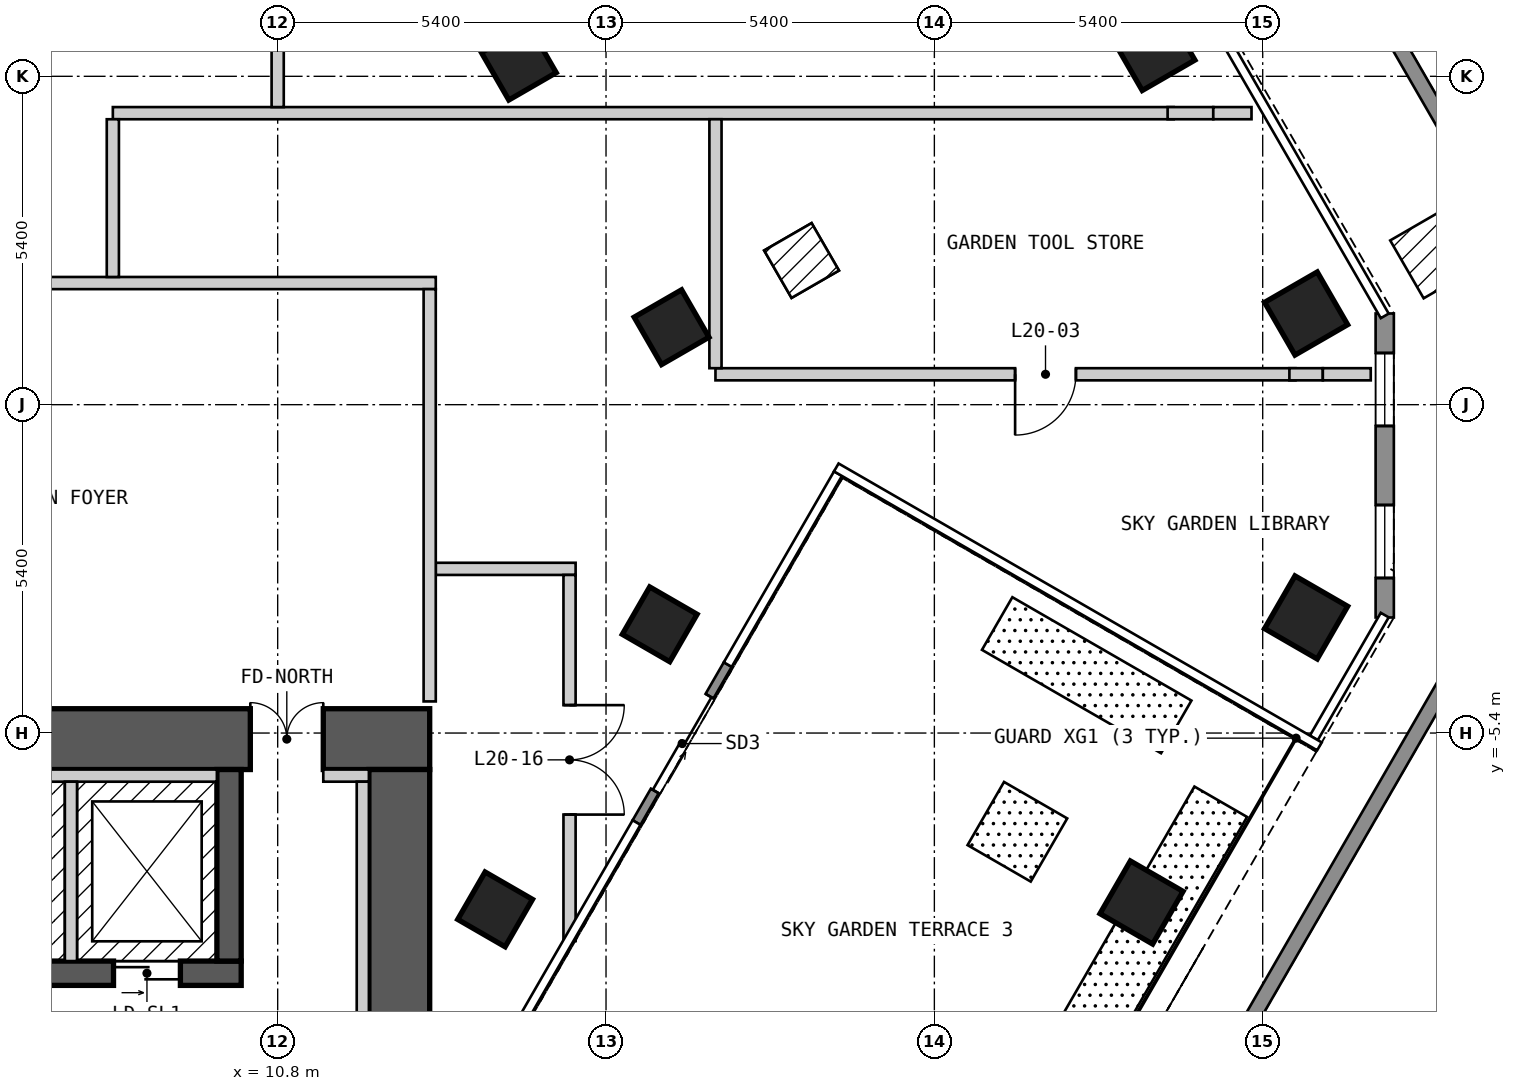
"""IFC4 building model, lengths in metres.
Left out: names, types, materials, properties, quantities, classifications, styles, units other than length and angle.
Written with IfcOpenShell. Run it as: python <this file> out.ifc"""

import sys

from ifc_helpers import new_model, si_unit, direction, frame, frame_2d, origin, origin_2d, place, context, subcontext, project, spatial, polyline, rectangle, outline, extrude, element, fill, save


model = new_model("IFC4")
c1 = context("Model", 3, precision=1e-05, world=origin(), true_north=direction((0.0, 1.0)))
c2 = subcontext(c1, "Body", "Model", "MODEL_VIEW")
j1 = project(units=[si_unit("LENGTHUNIT", "METRE"), si_unit("PLANEANGLEUNIT", "RADIAN")], contexts=[c1])
p1 = place(None, origin())
s1 = spatial("IfcSite", under=j1, at=p1, CompositionType="ELEMENT")
p2 = place(p1, origin())
s2 = spatial("IfcBuilding", under=s1, at=p2, CompositionType="ELEMENT")
p3 = place(p2, frame((0.0, 0.0, 66.0)))
s3 = spatial("IfcBuildingStorey", under=s2, at=p3, CompositionType="ELEMENT", Elevation=66.0)
for number, where, z_axis, x_axis in (
    (1, (25.007, -8.187, 0.0), (0.0, 0.0, 1.0), (0.5, 0.866, 0.0)),
    (2, (27.714, -3.499, 0.0), (0.0, 0.0, 1.0), (0.5, 0.866, 0.0)),
    (3, (27.714, 1.499, 0.0), (0.0, 0.0, 1.0), (-0.5, 0.866, 0.0)),
    (4, (25.202, 5.85, 0.0), (0.0, 0.0, 1.0), (-0.5, 0.866, 0.0)),
):
    element("IfcColumn", number, at=place(p3, frame(where, z_axis=z_axis, x_axis=x_axis)), inside=s3, PredefinedType="COLUMN", context=c2, shape_type="SweptSolid", body=[
        extrude(rectangle(XDim=1.0, YDim=1.0, at=origin_2d()), origin(), (0.0, 0.0, 1.0), 6.0),
    ])
for number, where, z_axis, x_axis in (
    (5, (14.376, -8.3, 0.0), (0.0, 0.0, 1.0), (0.5, 0.866, 0.0)),
    (6, (17.083, -3.612, 0.0), (0.0, 0.0, 1.0), (0.5, 0.866, 0.0)),
    (7, (17.278, 1.274, 0.0), (0.0, 0.0, 1.0), (-0.5, 0.866, 0.0)),
    (8, (14.766, 5.625, 0.0), (0.0, 0.0, 1.0), (-0.5, 0.866, 0.0)),
):
    element("IfcColumn", number, at=place(p3, frame(where, z_axis=z_axis, x_axis=x_axis)), inside=s3, PredefinedType="COLUMN", context=c2, shape_type="SweptSolid", body=[
        extrude(rectangle(XDim=0.9, YDim=0.9, at=origin_2d()), origin(), (0.0, 0.0, 1.0), 6.0),
    ])
p4 = place(p3, frame((-13.3, -5.5, 0.0), z_axis=(0.0, 0.0, 1.0), x_axis=(1.0, 0.0, 0.0)))
e9 = element("IfcWall", 9, at=p4, inside=s3, PredefinedType="SHEAR", context=c2, shape_type="SweptSolid", body=[
    extrude(rectangle(XDim=26.6, YDim=1.0, at=frame_2d((13.3, 0.0))), origin(), (0.0, 0.0, 1.0), 5.7),
])
p5 = place(p4, frame((23.65, 0.0, 0.0)))
e10 = element("IfcOpeningElement", 10, at=p5, cuts=e9, PredefinedType="OPENING", context=c2, shape_type="SweptSolid", body=[
    extrude(rectangle(XDim=1.2, YDim=2.1, at=frame_2d((0.6, 1.05))), frame((0.0, 0.51, 0.0), z_axis=(0.0, -1.0, 0.0), x_axis=(1.0, 0.0, 0.0)), (0.0, 0.0, 1.0), 1.02),
])
p6 = place(p3, frame((12.8, -18.0, 0.0), z_axis=(0.0, 0.0, 1.0), x_axis=(0.0, 1.0, 0.0)))
e11 = element("IfcWall", 11, at=p6, inside=s3, PredefinedType="SHEAR", context=c2, shape_type="SweptSolid", body=[
    extrude(rectangle(XDim=12.0, YDim=1.0, at=frame_2d((6.0, 0.0))), origin(), (0.0, 0.0, 1.0), 5.7),
])
p7 = place(p3, frame((-12.3, -9.35, 0.0), z_axis=(0.0, 0.0, 1.0), x_axis=(1.0, 0.0, 0.0)))
e12 = element("IfcWall", 12, at=p7, inside=s3, PredefinedType="SHEAR", context=c2, shape_type="SweptSolid", body=[
    extrude(rectangle(XDim=22.5, YDim=0.4, at=frame_2d((11.25, 0.0))), origin(), (0.0, 0.0, 1.0), 5.7),
])
p8 = place(p7, frame((0.9, 0.0, 0.0)))
e13 = element("IfcOpeningElement", 13, at=p8, cuts=e12, PredefinedType="OPENING", context=c2, shape_type="SweptSolid", body=[
    extrude(rectangle(XDim=1.1, YDim=2.1, at=frame_2d((0.55, 1.05))), frame((0.0, 0.21, 0.0), z_axis=(0.0, -1.0, 0.0), x_axis=(1.0, 0.0, 0.0)), (0.0, 0.0, 1.0), 0.42),
])
p9 = place(p7, frame((3.7, 0.0, 0.0)))
e14 = element("IfcOpeningElement", 14, at=p9, cuts=e12, PredefinedType="OPENING", context=c2, shape_type="SweptSolid", body=[
    extrude(rectangle(XDim=1.1, YDim=2.1, at=frame_2d((0.55, 1.05))), frame((0.0, 0.21, 0.0), z_axis=(0.0, -1.0, 0.0), x_axis=(1.0, 0.0, 0.0)), (0.0, 0.0, 1.0), 0.42),
])
p10 = place(p7, frame((6.5, 0.0, 0.0)))
e15 = element("IfcOpeningElement", 15, at=p10, cuts=e12, PredefinedType="OPENING", context=c2, shape_type="SweptSolid", body=[
    extrude(rectangle(XDim=1.1, YDim=2.1, at=frame_2d((0.55, 1.05))), frame((0.0, 0.21, 0.0), z_axis=(0.0, -1.0, 0.0), x_axis=(1.0, 0.0, 0.0)), (0.0, 0.0, 1.0), 0.42),
])
p11 = place(p7, frame((8.8, 0.0, 0.0)))
e16 = element("IfcOpeningElement", 16, at=p11, cuts=e12, PredefinedType="OPENING", context=c2, shape_type="SweptSolid", body=[
    extrude(rectangle(XDim=1.1, YDim=2.1, at=frame_2d((0.55, 1.05))), frame((0.0, 0.21, 0.0), z_axis=(0.0, -1.0, 0.0), x_axis=(1.0, 0.0, 0.0)), (0.0, 0.0, 1.0), 0.42),
])
p12 = place(p7, frame((11.1, 0.0, 0.0)))
e17 = element("IfcOpeningElement", 17, at=p12, cuts=e12, PredefinedType="OPENING", context=c2, shape_type="SweptSolid", body=[
    extrude(rectangle(XDim=1.1, YDim=2.1, at=frame_2d((0.55, 1.05))), frame((0.0, 0.21, 0.0), z_axis=(0.0, -1.0, 0.0), x_axis=(1.0, 0.0, 0.0)), (0.0, 0.0, 1.0), 0.42),
])
p13 = place(p7, frame((13.4, 0.0, 0.0)))
e18 = element("IfcOpeningElement", 18, at=p13, cuts=e12, PredefinedType="OPENING", context=c2, shape_type="SweptSolid", body=[
    extrude(rectangle(XDim=1.1, YDim=2.1, at=frame_2d((0.55, 1.05))), frame((0.0, 0.21, 0.0), z_axis=(0.0, -1.0, 0.0), x_axis=(1.0, 0.0, 0.0)), (0.0, 0.0, 1.0), 0.42),
])
p14 = place(p7, frame((15.7, 0.0, 0.0)))
e19 = element("IfcOpeningElement", 19, at=p14, cuts=e12, PredefinedType="OPENING", context=c2, shape_type="SweptSolid", body=[
    extrude(rectangle(XDim=1.1, YDim=2.1, at=frame_2d((0.55, 1.05))), frame((0.0, 0.21, 0.0), z_axis=(0.0, -1.0, 0.0), x_axis=(1.0, 0.0, 0.0)), (0.0, 0.0, 1.0), 0.42),
])
p15 = place(p7, frame((18.0, 0.0, 0.0)))
e20 = element("IfcOpeningElement", 20, at=p15, cuts=e12, PredefinedType="OPENING", context=c2, shape_type="SweptSolid", body=[
    extrude(rectangle(XDim=1.1, YDim=2.1, at=frame_2d((0.55, 1.05))), frame((0.0, 0.21, 0.0), z_axis=(0.0, -1.0, 0.0), x_axis=(1.0, 0.0, 0.0)), (0.0, 0.0, 1.0), 0.42),
])
p16 = place(p7, frame((20.4, 0.0, 0.0)))
e21 = element("IfcOpeningElement", 21, at=p16, cuts=e12, PredefinedType="OPENING", context=c2, shape_type="SweptSolid", body=[
    extrude(rectangle(XDim=1.1, YDim=2.1, at=frame_2d((0.55, 1.05))), frame((0.0, 0.21, 0.0), z_axis=(0.0, -1.0, 0.0), x_axis=(1.0, 0.0, 0.0)), (0.0, 0.0, 1.0), 0.42),
])
p17 = place(p3, frame((10.0, -9.15, 0.0), z_axis=(0.0, 0.0, 1.0), x_axis=(0.0, 1.0, 0.0)))
e22 = element("IfcWall", 22, at=p17, inside=s3, PredefinedType="SHEAR", context=c2, shape_type="SweptSolid", body=[
    extrude(rectangle(XDim=3.15, YDim=0.4, at=frame_2d((1.575, 0.0))), origin(), (0.0, 0.0, 1.0), 5.7),
])
p18 = place(p3, frame((29.007, -3.5, 0.0), z_axis=(0.0, 0.0, 1.0), x_axis=(0.0, 1.0, 0.0)))
e23 = element("IfcWall", 23, at=p18, inside=s3, PredefinedType="SOLIDWALL", context=c2, shape_type="SweptSolid", body=[
    extrude(outline(polyline([(0.0, -0.15), (5.0, -0.15), (4.92, 0.15), (0.08, 0.15), (0.0, -0.15)])), origin(), (0.0, 0.0, 1.0), 5.7),
])
p19 = place(p18, frame((0.65, 0.0, 0.15)))
e24 = element("IfcOpeningElement", 24, at=p19, cuts=e23, PredefinedType="OPENING", context=c2, shape_type="SweptSolid", body=[
    extrude(rectangle(XDim=1.2, YDim=2.1, at=frame_2d((0.6, 1.05))), frame((0.0, 0.16, 0.0), z_axis=(0.0, -1.0, 0.0), x_axis=(1.0, 0.0, 0.0)), (0.0, 0.0, 1.0), 0.32),
])
p20 = place(p18, frame((3.15, 0.0, 0.15)))
e25 = element("IfcOpeningElement", 25, at=p20, cuts=e23, PredefinedType="OPENING", context=c2, shape_type="SweptSolid", body=[
    extrude(rectangle(XDim=1.2, YDim=2.1, at=frame_2d((0.6, 1.05))), frame((0.0, 0.16, 0.0), z_axis=(0.0, -1.0, 0.0), x_axis=(1.0, 0.0, 0.0)), (0.0, 0.0, 1.0), 0.32),
])
p21 = place(p3, frame((16.702, -6.872, 0.0), z_axis=(0.0, 0.0, 1.0), x_axis=(0.499990139034, 0.866031096941, 0.0)))
e26 = element("IfcWall", 26, at=p21, inside=s3, PredefinedType="SOLIDWALL", context=c2, shape_type="SweptSolid", body=[
    extrude(rectangle(XDim=3.0, YDim=0.15, at=frame_2d((1.5, 0.0))), origin(), (0.0, 0.0, 1.0), 5.7),
])
p22 = place(p21, frame((0.6, 0.0, 0.0)))
e27 = element("IfcOpeningElement", 27, at=p22, cuts=e26, PredefinedType="OPENING", context=c2, shape_type="SweptSolid", body=[
    extrude(rectangle(XDim=1.8, YDim=2.4, at=frame_2d((0.9, 1.2))), frame((0.0, 0.085, 0.0), z_axis=(0.0, -1.0, 0.0), x_axis=(1.0, 0.0, 0.0)), (0.0, 0.0, 1.0), 0.17),
])
for number, where, z_axis, x_axis in (
    (28, (17.731, 25.837, 0.0), (0.0, 0.0, 1.0), (0.5, -0.866, 0.0)),
    (29, (31.242, -2.438, 0.0), (0.0, 0.0, 1.0), (-0.5, -0.866, 0.0)),
):
    element("IfcWall", number, at=place(p3, frame(where, z_axis=z_axis, x_axis=x_axis)), inside=s3, PredefinedType="PARAPET", context=c2, shape_type="SweptSolid", body=[
        extrude(outline(polyline([(0.067, -0.125), (26.953, -0.125), (27.02, 0.125), (0.0, 0.125), (0.067, -0.125)])), origin(), (0.0, 0.0, 1.0), 1.6),
    ])
p23 = place(p3, frame((13.4, -2.7, 0.0), z_axis=(0.0, 0.0, 1.0), x_axis=(1.0, 0.0, 0.0)))
e30 = element("IfcWall", 30, at=p23, inside=s3, PredefinedType="PARTITIONING", context=c2, shape_type="SweptSolid", body=[
    extrude(rectangle(XDim=2.3, YDim=0.2, at=frame_2d((1.15, 0.0))), origin(), (0.0, 0.0, 1.0), 5.7),
])
p24 = place(p3, frame((18.0, 0.5, 0.0), z_axis=(0.0, 0.0, 1.0), x_axis=(1.0, 0.0, 0.0)))
e31 = element("IfcWall", 31, at=p24, inside=s3, PredefinedType="PARTITIONING", context=c2, shape_type="SweptSolid", body=[
    extrude(rectangle(XDim=9.539, YDim=0.2, at=frame_2d((4.77, 0.0))), origin(), (0.0, 0.0, 1.0), 5.7),
])
p25 = place(p24, frame((5.928, 0.0, 0.0), z_axis=(0.0, 0.0, 1.0), x_axis=(-1.0, 0.0, 0.0)))
e32 = element("IfcOpeningElement", 32, at=p25, cuts=e31, PredefinedType="OPENING", context=c2, shape_type="SweptSolid", body=[
    extrude(rectangle(XDim=1.0, YDim=2.1, at=frame_2d((0.5, 1.05))), frame((0.0, 0.11, 0.0), z_axis=(0.0, -1.0, 0.0), x_axis=(1.0, 0.0, 0.0)), (0.0, 0.0, 1.0), 0.22),
])
p26 = place(p3, frame((27.439, 0.5, 0.0), z_axis=(0.0, 0.0, 1.0), x_axis=(1.0, 0.0, 0.0)))
e33 = element("IfcWall", 33, at=p26, inside=s3, PredefinedType="PARTITIONING", context=c2, shape_type="SweptSolid", body=[
    extrude(rectangle(XDim=0.55, YDim=0.2, at=frame_2d((0.275, 0.0))), origin(), (0.0, 0.0, 1.0), 5.02),
])
p27 = place(p3, frame((27.989, 0.5, 0.0), z_axis=(0.0, 0.0, 1.0), x_axis=(1.0, 0.0, 0.0)))
e34 = element("IfcWall", 34, at=p27, inside=s3, PredefinedType="PARTITIONING", context=c2, shape_type="SweptSolid", body=[
    extrude(rectangle(XDim=0.788, YDim=0.2, at=frame_2d((0.394, 0.0))), origin(), (0.0, 0.0, 1.0), 5.7),
])
p28 = place(p3, frame((-22.0, 2.0, 0.0), z_axis=(0.0, 0.0, 1.0), x_axis=(1.0, 0.0, 0.0)))
e35 = element("IfcWall", 35, at=p28, inside=s3, PredefinedType="PARTITIONING", context=c2, shape_type="SweptSolid", body=[
    extrude(rectangle(XDim=35.4, YDim=0.2, at=frame_2d((17.7, 0.0))), origin(), (0.0, 0.0, 1.0), 5.7),
])
p29 = place(p28, frame((3.89, 0.0, 0.0), z_axis=(0.0, 0.0, 1.0), x_axis=(-1.0, 0.0, 0.0)))
e36 = element("IfcOpeningElement", 36, at=p29, cuts=e35, PredefinedType="OPENING", context=c2, shape_type="SweptSolid", body=[
    extrude(rectangle(XDim=1.0, YDim=2.1, at=frame_2d((0.5, 1.05))), frame((0.0, 0.11, 0.0), z_axis=(0.0, -1.0, 0.0), x_axis=(1.0, 0.0, 0.0)), (0.0, 0.0, 1.0), 0.22),
])
p30 = place(p28, frame((21.1, 0.0, 0.0)))
e37 = element("IfcOpeningElement", 37, at=p30, cuts=e35, PredefinedType="OPENING", context=c2, shape_type="SweptSolid", body=[
    extrude(rectangle(XDim=1.8, YDim=2.1, at=frame_2d((0.9, 1.05))), frame((0.0, 0.11, 0.0), z_axis=(0.0, -1.0, 0.0), x_axis=(1.0, 0.0, 0.0)), (0.0, 0.0, 1.0), 0.22),
])
p31 = place(p28, frame((9.316, 0.0, 0.0)))
e38 = element("IfcOpeningElement", 38, at=p31, cuts=e35, PredefinedType="OPENING", context=c2, shape_type="SweptSolid", body=[
    extrude(rectangle(XDim=1.0, YDim=2.1, at=frame_2d((0.5, 1.05))), frame((0.0, 0.11, 0.0), z_axis=(0.0, -1.0, 0.0), x_axis=(1.0, 0.0, 0.0)), (0.0, 0.0, 1.0), 0.22),
])
p32 = place(p28, frame((13.102, 0.0, 0.0)))
e39 = element("IfcOpeningElement", 39, at=p32, cuts=e35, PredefinedType="OPENING", context=c2, shape_type="SweptSolid", body=[
    extrude(rectangle(XDim=1.8, YDim=2.1, at=frame_2d((0.9, 1.05))), frame((0.0, 0.11, 0.0), z_axis=(0.0, -1.0, 0.0), x_axis=(1.0, 0.0, 0.0)), (0.0, 0.0, 1.0), 0.22),
])
p33 = place(p3, frame((8.089, 4.794, 0.0), z_axis=(0.0, 0.0, 1.0), x_axis=(1.0, 0.0, 0.0)))
e40 = element("IfcWall", 40, at=p33, inside=s3, PredefinedType="PARTITIONING", context=c2, shape_type="SweptSolid", body=[
    extrude(rectangle(XDim=17.447, YDim=0.2, at=frame_2d((8.723, 0.0))), origin(), (0.0, 0.0, 1.0), 5.7),
])
p34 = place(p3, frame((25.436, 4.794, 0.0), z_axis=(0.0, 0.0, 1.0), x_axis=(1.0, 0.0, 0.0)))
e41 = element("IfcWall", 41, at=p34, inside=s3, PredefinedType="PARTITIONING", context=c2, shape_type="SweptSolid", body=[
    extrude(rectangle(XDim=0.751, YDim=0.2, at=frame_2d((0.375, 0.0))), origin(), (0.0, 0.0, 1.0), 5.02),
])
p35 = place(p3, frame((26.187, 4.794, 0.0), z_axis=(0.0, 0.0, 1.0), x_axis=(1.0, 0.0, 0.0)))
e42 = element("IfcWall", 42, at=p35, inside=s3, PredefinedType="PARTITIONING", context=c2, shape_type="SweptSolid", body=[
    extrude(rectangle(XDim=0.629, YDim=0.2, at=frame_2d((0.314, 0.0))), origin(), (0.0, 0.0, 1.0), 5.7),
])
p36 = place(p3, frame((8.089, 2.1, 0.0), z_axis=(0.0, 0.0, 1.0), x_axis=(0.0, 1.0, 0.0)))
e43 = element("IfcWall", 43, at=p36, inside=s3, PredefinedType="PARTITIONING", context=c2, shape_type="SweptSolid", body=[
    extrude(rectangle(XDim=2.594, YDim=0.2, at=frame_2d((1.297, 0.0))), origin(), (0.0, 0.0, 1.0), 5.7),
])
p37 = place(p3, frame((10.8, 4.894, 0.0), z_axis=(0.0, 0.0, 1.0), x_axis=(0.0, 1.0, 0.0)))
e44 = element("IfcWall", 44, at=p37, inside=s3, PredefinedType="PARTITIONING", context=c2, shape_type="SweptSolid", body=[
    extrude(rectangle(XDim=7.006, YDim=0.2, at=frame_2d((3.503, 0.0))), origin(), (0.0, 0.0, 1.0), 5.7),
])
p38 = place(p37, frame((2.905, 0.0, 0.0), z_axis=(0.0, 0.0, 1.0), x_axis=(-1.0, 0.0, 0.0)))
e45 = element("IfcOpeningElement", 45, at=p38, cuts=e44, PredefinedType="OPENING", context=c2, shape_type="SweptSolid", body=[
    extrude(rectangle(XDim=1.8, YDim=2.1, at=frame_2d((0.9, 1.05))), frame((0.0, 0.11, 0.0), z_axis=(0.0, -1.0, 0.0), x_axis=(1.0, 0.0, 0.0)), (0.0, 0.0, 1.0), 0.22),
])
p39 = place(p37, frame((6.605, 0.0, 0.0), z_axis=(0.0, 0.0, 1.0), x_axis=(-1.0, 0.0, 0.0)))
e46 = element("IfcOpeningElement", 46, at=p39, cuts=e44, PredefinedType="OPENING", context=c2, shape_type="SweptSolid", body=[
    extrude(rectangle(XDim=1.0, YDim=2.1, at=frame_2d((0.5, 1.05))), frame((0.0, 0.11, 0.0), z_axis=(0.0, -1.0, 0.0), x_axis=(1.0, 0.0, 0.0)), (0.0, 0.0, 1.0), 0.22),
])
p40 = place(p3, frame((13.3, -4.88, 0.0), z_axis=(0.0, 0.0, 1.0), x_axis=(0.0, 1.0, 0.0)))
e47 = element("IfcWall", 47, at=p40, inside=s3, PredefinedType="PARTITIONING", context=c2, shape_type="SweptSolid", body=[
    extrude(rectangle(XDim=6.78, YDim=0.2, at=frame_2d((3.39, 0.0))), origin(), (0.0, 0.0, 1.0), 5.7),
])
p41 = place(p3, frame((15.6, -8.821, 0.0), z_axis=(0.0, 0.0, 1.0), x_axis=(0.0, 1.0, 0.0)))
e48 = element("IfcWall", 48, at=p41, inside=s3, PredefinedType="PARTITIONING", context=c2, shape_type="SweptSolid", body=[
    extrude(rectangle(XDim=6.021, YDim=0.2, at=frame_2d((3.01, 0.0))), origin(), (0.0, 0.0, 1.0), 5.7),
])
p42 = place(p41, frame((3.88, 0.0, 0.0), z_axis=(0.0, 0.0, 1.0), x_axis=(-1.0, 0.0, 0.0)))
e49 = element("IfcOpeningElement", 49, at=p42, cuts=e48, PredefinedType="OPENING", context=c2, shape_type="SweptSolid", body=[
    extrude(rectangle(XDim=1.8, YDim=2.1, at=frame_2d((0.9, 1.05))), frame((0.0, 0.11, 0.0), z_axis=(0.0, -1.0, 0.0), x_axis=(1.0, 0.0, 0.0)), (0.0, 0.0, 1.0), 0.22),
])
p43 = place(p3, frame((18.0, 0.6, 0.0), z_axis=(0.0, 0.0, 1.0), x_axis=(0.0, 1.0, 0.0)))
e50 = element("IfcWall", 50, at=p43, inside=s3, PredefinedType="PARTITIONING", context=c2, shape_type="SweptSolid", body=[
    extrude(rectangle(XDim=4.094, YDim=0.2, at=frame_2d((2.047, 0.0))), origin(), (0.0, 0.0, 1.0), 5.7),
])
p44 = place(p3, frame((-6.3, -6.1, 0.0), z_axis=(0.0, 0.0, 1.0), x_axis=(1.0, 0.0, 0.0)))
e51 = element("IfcWall", 51, at=p44, inside=s3, PredefinedType="SOLIDWALL", context=c2, shape_type="SweptSolid", body=[
    extrude(rectangle(XDim=16.1, YDim=0.2, at=frame_2d((8.05, 0.0))), origin(), (0.0, 0.0, 1.0), 5.7),
])
p45 = place(p3, frame((7.4, -9.15, 0.0), z_axis=(0.0, 0.0, 1.0), x_axis=(0.0, 1.0, 0.0)))
e52 = element("IfcWall", 52, at=p45, inside=s3, PredefinedType="SOLIDWALL", context=c2, shape_type="SweptSolid", body=[
    extrude(rectangle(XDim=2.95, YDim=0.2, at=frame_2d((1.475, 0.0))), origin(), (0.0, 0.0, 1.0), 5.7),
])
p46 = place(p3, frame((11.55, -6.1, 0.0), z_axis=(0.0, 0.0, 1.0), x_axis=(1.0, 0.0, 0.0)))
e53 = element("IfcWall", 53, at=p46, inside=s3, PredefinedType="PARTITIONING", context=c2, shape_type="SweptSolid", body=[
    extrude(rectangle(XDim=0.75, YDim=0.2, at=frame_2d((0.375, 0.0))), origin(), (0.0, 0.0, 1.0), 5.7),
])
p47 = place(p3, frame((12.2, -14.45, 0.0), z_axis=(0.0, 0.0, 1.0), x_axis=(0.0, 1.0, 0.0)))
e54 = element("IfcWall", 54, at=p47, inside=s3, PredefinedType="PARTITIONING", context=c2, shape_type="SweptSolid", body=[
    extrude(rectangle(XDim=8.25, YDim=0.2, at=frame_2d((4.125, 0.0))), origin(), (0.0, 0.0, 1.0), 5.7),
])
p48 = place(p19, origin())
e55 = element("IfcWindow", 55, at=p48, inside=s3, PartitioningType="SINGLE_PANEL", PredefinedType="WINDOW", context=c2, shape_type="SweptSolid", body=[
    extrude(rectangle(XDim=1.2, YDim=2.1, at=frame_2d((0.6, 1.05))), frame((0.0, 0.03, 0.0), z_axis=(0.0, -1.0, 0.0), x_axis=(1.0, 0.0, 0.0)), (0.0, 0.0, 1.0), 0.06),
])
fill(e24, e55)
p49 = place(p20, origin())
e56 = element("IfcWindow", 56, at=p49, inside=s3, PartitioningType="SINGLE_PANEL", PredefinedType="WINDOW", context=c2, shape_type="SweptSolid", body=[
    extrude(rectangle(XDim=1.2, YDim=2.1, at=frame_2d((0.6, 1.05))), frame((0.0, 0.03, 0.0), z_axis=(0.0, -1.0, 0.0), x_axis=(1.0, 0.0, 0.0)), (0.0, 0.0, 1.0), 0.06),
])
fill(e25, e56)
p50 = place(p22, origin())
e57 = element("IfcDoor", 57, at=p50, inside=s3, OperationType="SLIDING_TO_LEFT", PredefinedType="DOOR", context=c2, shape_type="SweptSolid", body=[
    extrude(rectangle(XDim=1.8, YDim=2.4, at=frame_2d((0.9, 1.2))), frame((0.0, 0.025, 0.0), z_axis=(0.0, -1.0, 0.0), x_axis=(1.0, 0.0, 0.0)), (0.0, 0.0, 1.0), 0.05),
])
fill(e27, e57)
p51 = place(p25, origin())
e58 = element("IfcDoor", 58, at=p51, inside=s3, OperationType="SINGLE_SWING_RIGHT", PredefinedType="DOOR", context=c2, shape_type="SweptSolid", body=[
    extrude(rectangle(XDim=1.0, YDim=2.1, at=frame_2d((0.5, 1.05))), frame((0.0, 0.025, 0.0), z_axis=(0.0, -1.0, 0.0), x_axis=(1.0, 0.0, 0.0)), (0.0, 0.0, 1.0), 0.05),
])
fill(e32, e58)
p52 = place(p42, origin())
e59 = element("IfcDoor", 59, at=p52, inside=s3, OperationType="DOUBLE_DOOR_SINGLE_SWING", PredefinedType="DOOR", context=c2, shape_type="SweptSolid", body=[
    extrude(rectangle(XDim=1.8, YDim=2.1, at=frame_2d((0.9, 1.05))), frame((0.0, 0.025, 0.0), z_axis=(0.0, -1.0, 0.0), x_axis=(1.0, 0.0, 0.0)), (0.0, 0.0, 1.0), 0.05),
])
fill(e49, e59)
p53 = place(p16, origin())
e60 = element("IfcDoor", 60, at=p53, inside=s3, OperationType="DOUBLE_DOOR_SLIDING", PredefinedType="DOOR", context=c2, shape_type="SweptSolid", body=[
    extrude(rectangle(XDim=1.1, YDim=2.1, at=frame_2d((0.55, 1.05))), frame((0.0, 0.025, 0.0), z_axis=(0.0, -1.0, 0.0), x_axis=(1.0, 0.0, 0.0)), (0.0, 0.0, 1.0), 0.05),
])
fill(e21, e60)
p54 = place(p5, origin())
e61 = element("IfcDoor", 61, at=p54, inside=s3, OperationType="DOUBLE_DOOR_SINGLE_SWING", PredefinedType="DOOR", context=c2, shape_type="SweptSolid", body=[
    extrude(rectangle(XDim=1.2, YDim=2.1, at=frame_2d((0.6, 1.05))), frame((0.0, 0.025, 0.0), z_axis=(0.0, -1.0, 0.0), x_axis=(1.0, 0.0, 0.0)), (0.0, 0.0, 1.0), 0.05),
])
fill(e10, e61)
save(model, sys.argv[1])
